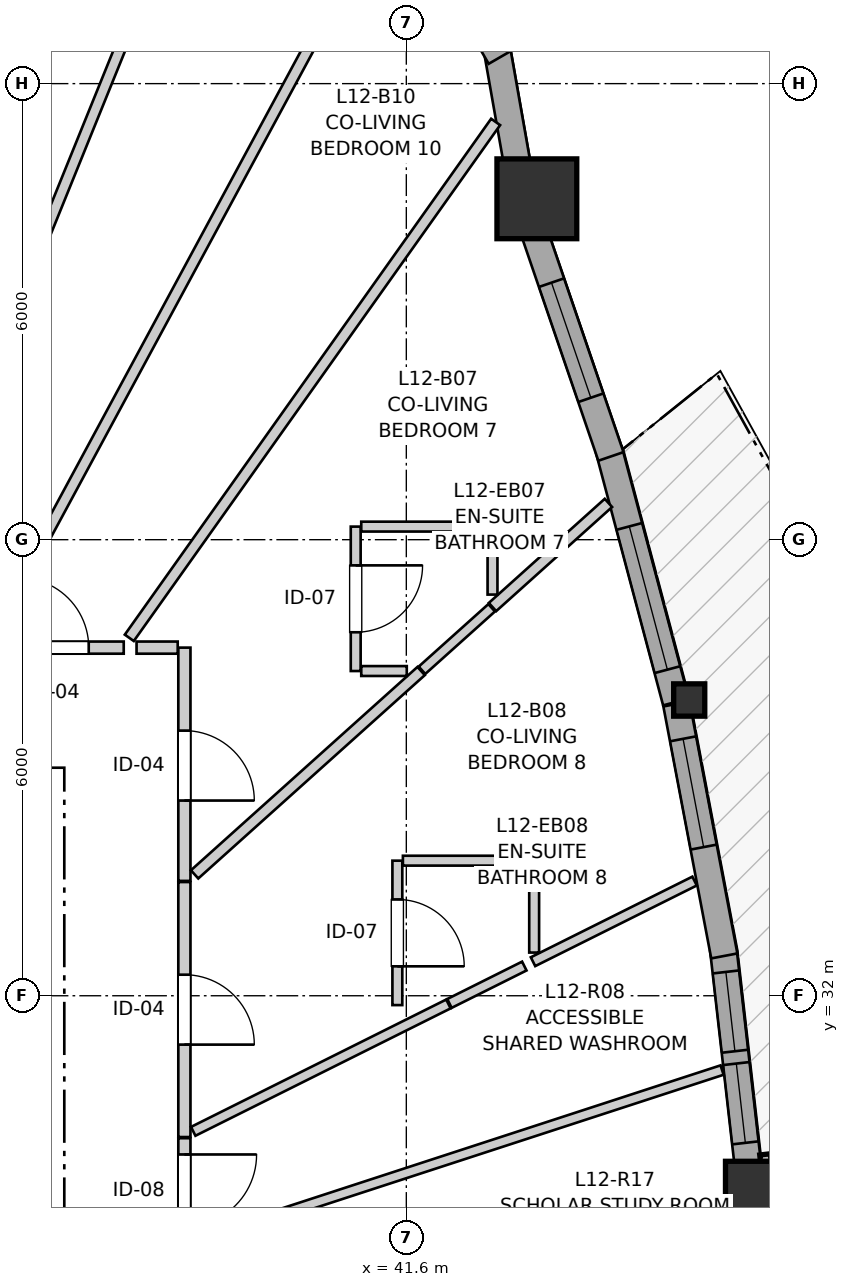
"""IFC4 building model, lengths in metres.
Left out: names, types, materials, properties, quantities, classifications, styles, units other than length and angle.
Written with IfcOpenShell. Run it as: python <this file> out.ifc"""

import sys

from ifc_helpers import new_model, si_unit, direction, frame, frame_2d, origin, origin_2d, place, context, subcontext, project, spatial, rectangle, i_section, extrude, source, transform, mapped, element, fill, save


model = new_model("IFC4")
c1 = context("Model", 3, precision=1e-05, world=origin(), true_north=direction((0.0, 1.0)))
c2 = subcontext(c1, "Body", "Model", "MODEL_VIEW")
j1 = project(units=[si_unit("LENGTHUNIT", "METRE"), si_unit("PLANEANGLEUNIT", "RADIAN")], contexts=[c1])
p1 = place(None, origin())
s1 = spatial("IfcSite", under=j1, at=p1, CompositionType="ELEMENT")
p2 = place(p1, origin())
s2 = spatial("IfcBuilding", under=s1, at=p2, CompositionType="ELEMENT")
p3 = place(p2, frame((0.0, 0.0, 43.0)))
s3 = spatial("IfcBuildingStorey", under=s2, at=p3, CompositionType="ELEMENT", Elevation=43.0)
m1 = source(origin(), c2, "Body", "SweptSolid", [
    extrude(rectangle(XDim=1.05, YDim=1.05, at=origin_2d()), origin(), (0.0, 0.0, 1.0), 2.94),
])
p4 = place(p3, frame((46.324, 29.297, 0.0), z_axis=(0.0, 0.0, 1.0), x_axis=(1.0, 0.0, 0.0)))
e1 = element("IfcColumn", 1, at=p4, inside=s3, PredefinedType="COLUMN", context=c2, shape_type="MappedRepresentation", body=[
    mapped(m1, transform((0.0, 0.0, 0.0), x_axis=(1.0, 0.0, 0.0), y_axis=(0.0, 1.0, 0.0), z_axis=(0.0, 0.0, 1.0), scale=1.0)),
])
m2 = source(origin(), c2, "Body", "SweptSolid", [
    extrude(i_section(OverallWidth=0.409, OverallDepth=0.425, WebThickness=0.03, FlangeThickness=0.048, FilletRadius=0.015, at=origin_2d()), origin(), (0.0, 0.0, 1.0), 2.94),
])
p5 = place(p3, frame((45.322, 35.891, 0.0), z_axis=(0.0, 0.0, 1.0), x_axis=(1.0, 0.0, 0.0)))
e2 = element("IfcColumn", 2, at=p5, inside=s3, PredefinedType="PILASTER", context=c2, shape_type="MappedRepresentation", body=[
    mapped(m2, transform((0.0, 0.0, 0.0), x_axis=(1.0, 0.0, 0.0), y_axis=(0.0, 1.0, 0.0), z_axis=(0.0, 0.0, 1.0), scale=1.0)),
])
p6 = place(p3, frame((43.317, 42.485, 0.0), z_axis=(0.0, 0.0, 1.0), x_axis=(1.0, 0.0, 0.0)))
e3 = element("IfcColumn", 3, at=p6, inside=s3, PredefinedType="COLUMN", context=c2, shape_type="MappedRepresentation", body=[
    mapped(m1, transform((0.0, 0.0, 0.0), x_axis=(1.0, 0.0, 0.0), y_axis=(0.0, 1.0, 0.0), z_axis=(0.0, 0.0, 1.0), scale=1.0)),
])
p7 = place(p3, frame((46.116, 29.575, 0.0), z_axis=(0.0, 0.0, 1.0), x_axis=(-0.113271733229, 0.993564046477, 0.0)))
e4 = element("IfcWall", 4, at=p7, inside=s3, PredefinedType="SOLIDWALL", context=c2, shape_type="SweptSolid", body=[
    extrude(rectangle(XDim=3.056, YDim=0.35, at=frame_2d((1.528, 0.0))), origin(), (0.0, 0.0, 1.0), 2.42),
])
p8 = place(p7, frame((0.492, 0.0, 0.82)))
e5 = element("IfcOpeningElement", 5, at=p8, cuts=e4, PredefinedType="OPENING", context=c2, shape_type="SweptSolid", body=[
    extrude(rectangle(XDim=1.05, YDim=1.45, at=frame_2d((0.525, 0.725))), frame((0.0, 0.185, 0.0), z_axis=(0.0, -1.0, 0.0), x_axis=(1.0, 0.0, 0.0)), (0.0, 0.0, 1.0), 0.37),
])
p9 = place(p7, frame((1.706, 0.0, 0.82)))
e6 = element("IfcOpeningElement", 6, at=p9, cuts=e4, PredefinedType="OPENING", context=c2, shape_type="SweptSolid", body=[
    extrude(rectangle(XDim=1.05, YDim=1.45, at=frame_2d((0.525, 0.725))), frame((0.0, 0.185, 0.0), z_axis=(0.0, -1.0, 0.0), x_axis=(1.0, 0.0, 0.0)), (0.0, 0.0, 1.0), 0.37),
])
p10 = place(p3, frame((45.784, 32.524, 0.0), z_axis=(0.0, 0.0, 1.0), x_axis=(-0.186686485801, 0.982419541754, 0.0)))
e7 = element("IfcWall", 7, at=p10, inside=s3, PredefinedType="SOLIDWALL", context=c2, shape_type="SweptSolid", body=[
    extrude(rectangle(XDim=3.374, YDim=0.35, at=frame_2d((1.687, 0.0))), origin(), (0.0, 0.0, 1.0), 2.42),
])
p11 = place(p10, frame((1.457, 0.0, 0.82)))
e8 = element("IfcOpeningElement", 8, at=p11, cuts=e7, PredefinedType="OPENING", context=c2, shape_type="SweptSolid", body=[
    extrude(rectangle(XDim=1.45, YDim=1.25, at=frame_2d((0.725, 0.625))), frame((0.0, 0.185, 0.0), z_axis=(0.0, -1.0, 0.0), x_axis=(1.0, 0.0, 0.0)), (0.0, 0.0, 1.0), 0.37),
])
p12 = place(p3, frame((45.148, 35.865, 0.0), z_axis=(0.0, 0.0, 1.0), x_axis=(-0.257064434129, 0.966394265663, 0.0)))
e9 = element("IfcWall", 9, at=p12, inside=s3, PredefinedType="SOLIDWALL", context=c2, shape_type="SweptSolid", body=[
    extrude(rectangle(XDim=3.429, YDim=0.35, at=frame_2d((1.715, 0.0))), origin(), (0.0, 0.0, 1.0), 2.42),
])
p13 = place(p12, frame((0.44, 0.0, 0.82)))
e10 = element("IfcOpeningElement", 10, at=p13, cuts=e9, PredefinedType="OPENING", context=c2, shape_type="SweptSolid", body=[
    extrude(rectangle(XDim=1.95, YDim=1.4, at=frame_2d((0.975, 0.7))), frame((0.0, 0.185, 0.0), z_axis=(0.0, -1.0, 0.0), x_axis=(1.0, 0.0, 0.0)), (0.0, 0.0, 1.0), 0.37),
])
p14 = place(p3, frame((44.292, 39.095, 0.0), z_axis=(0.0, 0.0, 1.0), x_axis=(-0.323582370233, 0.946200005112, 0.0)))
e11 = element("IfcWall", 11, at=p14, inside=s3, PredefinedType="SOLIDWALL", context=c2, shape_type="SweptSolid", body=[
    extrude(rectangle(XDim=3.222, YDim=0.35, at=frame_2d((1.611, 0.0))), origin(), (0.0, 0.0, 1.0), 2.42),
])
p15 = place(p14, frame((0.816, 0.0, 0.82)))
e12 = element("IfcOpeningElement", 12, at=p15, cuts=e11, PredefinedType="OPENING", context=c2, shape_type="SweptSolid", body=[
    extrude(rectangle(XDim=1.6, YDim=1.35, at=frame_2d((0.8, 0.675))), frame((0.0, 0.185, 0.0), z_axis=(0.0, -1.0, 0.0), x_axis=(1.0, 0.0, 0.0)), (0.0, 0.0, 1.0), 0.37),
])
p16 = place(p3, frame((43.093, 42.75, 0.0), z_axis=(0.0, 0.0, 1.0), x_axis=(-0.173610462023, 0.984814402553, 0.0)))
e13 = element("IfcWall", 13, at=p16, inside=s3, PredefinedType="SOLIDWALL", context=c2, shape_type="SweptSolid", body=[
    extrude(rectangle(XDim=1.752, YDim=0.35, at=frame_2d((0.876, 0.0))), origin(), (0.0, 0.0, 1.0), 2.42),
])
p17 = place(p3, frame((42.835, 44.348, 0.0), z_axis=(0.0, 0.0, 1.0), x_axis=(-0.499995423472, 0.866028046028, 0.0)))
e14 = element("IfcWall", 14, at=p17, inside=s3, PredefinedType="SOLIDWALL", context=c2, shape_type="SweptSolid", body=[
    extrude(rectangle(XDim=2.09, YDim=0.35, at=frame_2d((1.045, 0.0))), origin(), (0.0, 0.0, 1.0), 2.42),
])
p18 = place(p17, frame((0.42, 0.0, 0.82)))
e15 = element("IfcOpeningElement", 15, at=p18, cuts=e14, PredefinedType="OPENING", context=c2, shape_type="SweptSolid", body=[
    extrude(rectangle(XDim=1.25, YDim=1.35, at=frame_2d((0.625, 0.675))), frame((0.0, 0.185, 0.0), z_axis=(0.0, -1.0, 0.0), x_axis=(1.0, 0.0, 0.0)), (0.0, 0.0, 1.0), 0.37),
])
p19 = place(p3, frame((38.68, 33.496, 0.0), z_axis=(0.0, 0.0, 1.0), x_axis=(0.0, -1.0, 0.0)))
e16 = element("IfcWall", 16, at=p19, inside=s3, PredefinedType="PARTITIONING", context=c2, shape_type="SweptSolid", body=[
    extrude(rectangle(XDim=3.355, YDim=0.16, at=frame_2d((1.677, 0.0))), origin(), (0.0, 0.0, 1.0), 2.94),
])
p20 = place(p19, frame((1.219, 0.0, 0.0)))
e17 = element("IfcOpeningElement", 17, at=p20, cuts=e16, PredefinedType="OPENING", context=c2, shape_type="SweptSolid", body=[
    extrude(rectangle(XDim=0.92, YDim=2.1, at=frame_2d((0.46, 1.05))), frame((0.0, 0.09, 0.0), z_axis=(0.0, -1.0, 0.0), x_axis=(1.0, 0.0, 0.0)), (0.0, 0.0, 1.0), 0.18),
])
p21 = place(p3, frame((38.68, 36.58, 0.0), z_axis=(0.0, 0.0, 1.0), x_axis=(0.0, -1.0, 0.0)))
e18 = element("IfcWall", 18, at=p21, inside=s3, PredefinedType="PARTITIONING", context=c2, shape_type="SweptSolid", body=[
    extrude(rectangle(XDim=3.069, YDim=0.16, at=frame_2d((1.535, 0.0))), origin(), (0.0, 0.0, 1.0), 2.94),
])
p22 = place(p21, frame((1.092, 0.0, 0.0)))
e19 = element("IfcOpeningElement", 19, at=p22, cuts=e18, PredefinedType="OPENING", context=c2, shape_type="SweptSolid", body=[
    extrude(rectangle(XDim=0.92, YDim=2.1, at=frame_2d((0.46, 1.05))), frame((0.0, 0.09, 0.0), z_axis=(0.0, -1.0, 0.0), x_axis=(1.0, 0.0, 0.0)), (0.0, 0.0, 1.0), 0.18),
])
p23 = place(p3, frame((41.482, 33.777, 0.0), z_axis=(0.0, 0.0, 1.0), x_axis=(0.0, -1.0, 0.0)))
e20 = element("IfcWall", 20, at=p23, inside=s3, PredefinedType="PARTITIONING", context=c2, shape_type="SweptSolid", body=[
    extrude(rectangle(XDim=1.9, YDim=0.13, at=frame_2d((0.95, 0.0))), origin(), (0.0, 0.0, 1.0), 2.94),
])
p24 = place(p23, frame((0.51, 0.0, 0.0)))
e21 = element("IfcOpeningElement", 21, at=p24, cuts=e20, PredefinedType="OPENING", context=c2, shape_type="SweptSolid", body=[
    extrude(rectangle(XDim=0.88, YDim=2.05, at=frame_2d((0.44, 1.025))), frame((0.0, 0.075, 0.0), z_axis=(0.0, -1.0, 0.0), x_axis=(1.0, 0.0, 0.0)), (0.0, 0.0, 1.0), 0.15),
])
p25 = place(p3, frame((40.934, 38.172, 0.0), z_axis=(0.0, 0.0, 1.0), x_axis=(0.0, -1.0, 0.0)))
e22 = element("IfcWall", 22, at=p25, inside=s3, PredefinedType="PARTITIONING", context=c2, shape_type="SweptSolid", body=[
    extrude(rectangle(XDim=1.9, YDim=0.13, at=frame_2d((0.95, 0.0))), origin(), (0.0, 0.0, 1.0), 2.94),
])
p26 = place(p25, frame((0.51, 0.0, 0.0)))
e23 = element("IfcOpeningElement", 23, at=p26, cuts=e22, PredefinedType="OPENING", context=c2, shape_type="SweptSolid", body=[
    extrude(rectangle(XDim=0.88, YDim=2.05, at=frame_2d((0.44, 1.025))), frame((0.0, 0.075, 0.0), z_axis=(0.0, -1.0, 0.0), x_axis=(1.0, 0.0, 0.0)), (0.0, 0.0, 1.0), 0.15),
])
p27 = place(p3, frame((36.042, 36.58, 0.0), z_axis=(0.0, 0.0, 1.0), x_axis=(1.0, 0.0, 0.0)))
e24 = element("IfcWall", 24, at=p27, inside=s3, PredefinedType="PARTITIONING", context=c2, shape_type="SweptSolid", body=[
    extrude(rectangle(XDim=1.84, YDim=0.16, at=frame_2d((0.92, 0.0))), origin(), (0.0, 0.0, 1.0), 2.94),
])
p28 = place(p27, frame((0.459, 0.0, 0.0)))
e25 = element("IfcOpeningElement", 25, at=p28, cuts=e24, PredefinedType="OPENING", context=c2, shape_type="SweptSolid", body=[
    extrude(rectangle(XDim=0.92, YDim=2.1, at=frame_2d((0.46, 1.05))), frame((0.0, 0.09, 0.0), z_axis=(0.0, -1.0, 0.0), x_axis=(1.0, 0.0, 0.0)), (0.0, 0.0, 1.0), 0.18),
])
p29 = place(p3, frame((38.68, 30.126, 0.0), z_axis=(0.0, 0.0, 1.0), x_axis=(0.0, -1.0, 0.0)))
e26 = element("IfcWall", 26, at=p29, inside=s3, PredefinedType="PARTITIONING", context=c2, shape_type="SweptSolid", body=[
    extrude(rectangle(XDim=1.426, YDim=0.16, at=frame_2d((0.713, 0.0))), origin(), (0.0, 0.0, 1.0), 2.94),
])
p30 = place(p29, frame((0.214, 0.0, 0.0)))
e27 = element("IfcOpeningElement", 27, at=p30, cuts=e26, PredefinedType="OPENING", context=c2, shape_type="SweptSolid", body=[
    extrude(rectangle(XDim=0.95, YDim=2.1, at=frame_2d((0.475, 1.05))), frame((0.0, 0.09, 0.0), z_axis=(0.0, -1.0, 0.0), x_axis=(1.0, 0.0, 0.0)), (0.0, 0.0, 1.0), 0.18),
])
p31 = place(p3, frame((34.686, 36.695, 0.0), z_axis=(0.0, 0.0, 1.0), x_axis=(0.375735926904, 0.926726773776, 0.0)))
e28 = element("IfcWall", 28, at=p31, inside=s3, PredefinedType="PARTITIONING", context=c2, shape_type="SweptSolid", body=[
    extrude(rectangle(XDim=11.769, YDim=0.145, at=frame_2d((5.884, 0.0))), origin(), (0.0, 0.0, 1.0), 2.94),
])
p32 = place(p3, frame((36.125, 36.701, 0.0), z_axis=(0.0, 0.0, 1.0), x_axis=(0.474948586069, 0.880013545686, 0.0)))
e29 = element("IfcWall", 29, at=p32, inside=s3, PredefinedType="PARTITIONING", context=c2, shape_type="SweptSolid", body=[
    extrude(rectangle(XDim=10.889, YDim=0.145, at=frame_2d((5.445, 0.0))), origin(), (0.0, 0.0, 1.0), 2.94),
])
p33 = place(p3, frame((37.955, 36.708, 0.0), z_axis=(0.0, 0.0, 1.0), x_axis=(0.578991718582, 0.81533342248, 0.0)))
e30 = element("IfcWall", 30, at=p33, inside=s3, PredefinedType="PARTITIONING", context=c2, shape_type="SweptSolid", body=[
    extrude(rectangle(XDim=8.325, YDim=0.145, at=frame_2d((4.163, 0.0))), origin(), (0.0, 0.0, 1.0), 2.94),
])
p34 = place(p3, frame((38.788, 28.751, 0.0), z_axis=(0.0, 0.0, 1.0), x_axis=(0.95075822996, 0.309933522169, 0.0)))
e31 = element("IfcWall", 31, at=p34, inside=s3, PredefinedType="PARTITIONING", context=c2, shape_type="SweptSolid", body=[
    extrude(rectangle(XDim=7.327, YDim=0.13, at=frame_2d((3.664, 0.0))), origin(), (0.0, 0.0, 1.0), 2.94),
])
p35 = place(p3, frame((38.814, 33.597, 0.0), z_axis=(0.0, 0.0, 1.0), x_axis=(0.74417856937, 0.667980730927, 0.0)))
e32 = element("IfcWall", 32, at=p35, inside=s3, PredefinedType="PARTITIONING", context=c2, shape_type="SweptSolid", body=[
    extrude(rectangle(XDim=4.005, YDim=0.145, at=frame_2d((2.002, 0.0))), origin(), (0.0, 0.0, 1.0), 2.94),
])
p36 = place(p3, frame((38.796, 30.216, 0.0), z_axis=(0.0, 0.0, 1.0), x_axis=(0.894739227469, 0.446588977503, 0.0)))
e33 = element("IfcWall", 33, at=p36, inside=s3, PredefinedType="PARTITIONING", context=c2, shape_type="SweptSolid", body=[
    extrude(rectangle(XDim=3.753, YDim=0.13, at=frame_2d((1.876, 0.0))), origin(), (0.0, 0.0, 1.0), 2.94),
])
p37 = place(p3, frame((43.267, 32.448, 0.0), z_axis=(0.0, 0.0, 1.0), x_axis=(0.894755827923, 0.446555717014, 0.0)))
e34 = element("IfcWall", 34, at=p37, inside=s3, PredefinedType="PARTITIONING", context=c2, shape_type="SweptSolid", body=[
    extrude(rectangle(XDim=2.375, YDim=0.13, at=frame_2d((1.188, 0.0))), origin(), (0.0, 0.0, 1.0), 2.94),
])
p38 = place(p3, frame((42.734, 37.114, 0.0), z_axis=(0.0, 0.0, 1.0), x_axis=(0.743962922365, 0.668220899214, 0.0)))
e35 = element("IfcWall", 35, at=p38, inside=s3, PredefinedType="PARTITIONING", context=c2, shape_type="SweptSolid", body=[
    extrude(rectangle(XDim=2.05, YDim=0.145, at=frame_2d((1.025, 0.0))), origin(), (0.0, 0.0, 1.0), 2.94),
])
p39 = place(p3, frame((41.007, 38.172, 0.0), z_axis=(0.0, 0.0, 1.0), x_axis=(1.0, 0.0, 0.0)))
e36 = element("IfcWall", 36, at=p39, inside=s3, PredefinedType="PARTITIONING", context=c2, shape_type="SweptSolid", body=[
    extrude(rectangle(XDim=1.727, YDim=0.13, at=frame_2d((0.863, 0.0))), origin(), (0.0, 0.0, 1.0), 2.94),
])
p40 = place(p3, frame((41.555, 33.777, 0.0), z_axis=(0.0, 0.0, 1.0), x_axis=(1.0, 0.0, 0.0)))
e37 = element("IfcWall", 37, at=p40, inside=s3, PredefinedType="PARTITIONING", context=c2, shape_type="SweptSolid", body=[
    extrude(rectangle(XDim=1.727, YDim=0.13, at=frame_2d((0.864, 0.0))), origin(), (0.0, 0.0, 1.0), 2.94),
])
p41 = place(p3, frame((43.282, 32.568, 0.0), z_axis=(0.0, 0.0, 1.0), x_axis=(0.0, 1.0, 0.0)))
e38 = element("IfcWall", 38, at=p41, inside=s3, PredefinedType="PARTITIONING", context=c2, shape_type="SweptSolid", body=[
    extrude(rectangle(XDim=1.136, YDim=0.13, at=frame_2d((0.568, 0.0))), origin(), (0.0, 0.0, 1.0), 2.94),
])
p42 = place(p3, frame((41.806, 36.282, 0.0), z_axis=(0.0, 0.0, 1.0), x_axis=(0.744525261569, 0.667594289135, 0.0)))
e39 = element("IfcWall", 39, at=p42, inside=s3, PredefinedType="PARTITIONING", context=c2, shape_type="SweptSolid", body=[
    extrude(rectangle(XDim=1.231, YDim=0.13, at=frame_2d((0.616, 0.0))), origin(), (0.0, 0.0, 1.0), 2.94),
])
p43 = place(p3, frame((42.167, 31.899, 0.0), z_axis=(0.0, 0.0, 1.0), x_axis=(0.894604533516, 0.446858734515, 0.0)))
e40 = element("IfcWall", 40, at=p43, inside=s3, PredefinedType="PARTITIONING", context=c2, shape_type="SweptSolid", body=[
    extrude(rectangle(XDim=1.101, YDim=0.13, at=frame_2d((0.55, 0.0))), origin(), (0.0, 0.0, 1.0), 2.94),
])
p44 = place(p3, frame((42.734, 37.278, 0.0), z_axis=(0.0, 0.0, 1.0), x_axis=(0.0, 1.0, 0.0)))
e41 = element("IfcWall", 41, at=p44, inside=s3, PredefinedType="PARTITIONING", context=c2, shape_type="SweptSolid", body=[
    extrude(rectangle(XDim=0.821, YDim=0.13, at=frame_2d((0.411, 0.0))), origin(), (0.0, 0.0, 1.0), 2.94),
])
p45 = place(p3, frame((41.007, 36.272, 0.0), z_axis=(0.0, 0.0, 1.0), x_axis=(1.0, 0.0, 0.0)))
e42 = element("IfcWall", 42, at=p45, inside=s3, PredefinedType="PARTITIONING", context=c2, shape_type="SweptSolid", body=[
    extrude(rectangle(XDim=0.599, YDim=0.13, at=frame_2d((0.299, 0.0))), origin(), (0.0, 0.0, 1.0), 2.94),
])
p46 = place(p3, frame((38.051, 36.58, 0.0), z_axis=(0.0, 0.0, 1.0), x_axis=(1.0, 0.0, 0.0)))
e43 = element("IfcWall", 43, at=p46, inside=s3, PredefinedType="PARTITIONING", context=c2, shape_type="SweptSolid", body=[
    extrude(rectangle(XDim=0.541, YDim=0.16, at=frame_2d((0.271, 0.0))), origin(), (0.0, 0.0, 1.0), 2.94),
])
m3 = source(origin(), c2, "Body", "SweptSolid", [
    extrude(rectangle(XDim=1.05, YDim=1.45, at=frame_2d((0.525, 0.725))), frame((0.0, 0.03, 0.0), z_axis=(0.0, -1.0, 0.0), x_axis=(1.0, 0.0, 0.0)), (0.0, 0.0, 1.0), 0.06),
])
p47 = place(p8, origin())
e44 = element("IfcWindow", 44, at=p47, inside=s3, PartitioningType="SINGLE_PANEL", PredefinedType="WINDOW", context=c2, shape_type="MappedRepresentation", body=[
    mapped(m3, transform((0.0, 0.0, 0.0), x_axis=(1.0, 0.0, 0.0), y_axis=(0.0, 1.0, 0.0), z_axis=(0.0, 0.0, 1.0), scale=1.0)),
])
fill(e5, e44)
p48 = place(p9, origin())
e45 = element("IfcWindow", 45, at=p48, inside=s3, PartitioningType="SINGLE_PANEL", PredefinedType="WINDOW", context=c2, shape_type="MappedRepresentation", body=[
    mapped(m3, transform((0.0, 0.0, 0.0), x_axis=(1.0, 0.0, 0.0), y_axis=(0.0, 1.0, 0.0), z_axis=(0.0, 0.0, 1.0), scale=1.0)),
])
fill(e6, e45)
m4 = source(origin(), c2, "Body", "SweptSolid", [
    extrude(rectangle(XDim=1.45, YDim=1.25, at=frame_2d((0.725, 0.625))), frame((0.0, 0.03, 0.0), z_axis=(0.0, -1.0, 0.0), x_axis=(1.0, 0.0, 0.0)), (0.0, 0.0, 1.0), 0.06),
])
p49 = place(p11, origin())
e46 = element("IfcWindow", 46, at=p49, inside=s3, PartitioningType="SINGLE_PANEL", PredefinedType="WINDOW", context=c2, shape_type="MappedRepresentation", body=[
    mapped(m4, transform((0.0, 0.0, 0.0), x_axis=(1.0, 0.0, 0.0), y_axis=(0.0, 1.0, 0.0), z_axis=(0.0, 0.0, 1.0), scale=1.0)),
])
fill(e8, e46)
m5 = source(origin(), c2, "Body", "SweptSolid", [
    extrude(rectangle(XDim=1.95, YDim=1.4, at=frame_2d((0.975, 0.7))), frame((0.0, 0.03, 0.0), z_axis=(0.0, -1.0, 0.0), x_axis=(1.0, 0.0, 0.0)), (0.0, 0.0, 1.0), 0.06),
])
p50 = place(p13, origin())
e47 = element("IfcWindow", 47, at=p50, inside=s3, PartitioningType="SINGLE_PANEL", PredefinedType="WINDOW", context=c2, shape_type="MappedRepresentation", body=[
    mapped(m5, transform((0.0, 0.0, 0.0), x_axis=(1.0, 0.0, 0.0), y_axis=(0.0, 1.0, 0.0), z_axis=(0.0, 0.0, 1.0), scale=1.0)),
])
fill(e10, e47)
m6 = source(origin(), c2, "Body", "SweptSolid", [
    extrude(rectangle(XDim=1.6, YDim=1.35, at=frame_2d((0.8, 0.675))), frame((0.0, 0.03, 0.0), z_axis=(0.0, -1.0, 0.0), x_axis=(1.0, 0.0, 0.0)), (0.0, 0.0, 1.0), 0.06),
])
p51 = place(p15, origin())
e48 = element("IfcWindow", 48, at=p51, inside=s3, PartitioningType="SINGLE_PANEL", PredefinedType="WINDOW", context=c2, shape_type="MappedRepresentation", body=[
    mapped(m6, transform((0.0, 0.0, 0.0), x_axis=(1.0, 0.0, 0.0), y_axis=(0.0, 1.0, 0.0), z_axis=(0.0, 0.0, 1.0), scale=1.0)),
])
fill(e12, e48)
m7 = source(origin(), c2, "Body", "SweptSolid", [
    extrude(rectangle(XDim=0.92, YDim=2.1, at=frame_2d((0.46, 1.05))), frame((0.0, 0.025, 0.0), z_axis=(0.0, -1.0, 0.0), x_axis=(1.0, 0.0, 0.0)), (0.0, 0.0, 1.0), 0.05),
])
p52 = place(p20, origin())
e49 = element("IfcDoor", 49, at=p52, inside=s3, OperationType="SINGLE_SWING_RIGHT", PredefinedType="DOOR", context=c2, shape_type="MappedRepresentation", body=[
    mapped(m7, transform((0.0, 0.0, 0.0), x_axis=(1.0, 0.0, 0.0), y_axis=(0.0, 1.0, 0.0), z_axis=(0.0, 0.0, 1.0), scale=1.0)),
])
fill(e17, e49)
p53 = place(p22, origin())
e50 = element("IfcDoor", 50, at=p53, inside=s3, OperationType="SINGLE_SWING_RIGHT", PredefinedType="DOOR", context=c2, shape_type="MappedRepresentation", body=[
    mapped(m7, transform((0.0, 0.0, 0.0), x_axis=(1.0, 0.0, 0.0), y_axis=(0.0, 1.0, 0.0), z_axis=(0.0, 0.0, 1.0), scale=1.0)),
])
fill(e19, e50)
m8 = source(origin(), c2, "Body", "SweptSolid", [
    extrude(rectangle(XDim=0.88, YDim=2.05, at=frame_2d((0.44, 1.025))), frame((0.0, 0.025, 0.0), z_axis=(0.0, -1.0, 0.0), x_axis=(1.0, 0.0, 0.0)), (0.0, 0.0, 1.0), 0.05),
])
p54 = place(p24, origin())
e51 = element("IfcDoor", 51, at=p54, inside=s3, OperationType="SINGLE_SWING_RIGHT", PredefinedType="DOOR", context=c2, shape_type="MappedRepresentation", body=[
    mapped(m8, transform((0.0, 0.0, 0.0), x_axis=(1.0, 0.0, 0.0), y_axis=(0.0, 1.0, 0.0), z_axis=(0.0, 0.0, 1.0), scale=1.0)),
])
fill(e21, e51)
p55 = place(p26, origin())
e52 = element("IfcDoor", 52, at=p55, inside=s3, OperationType="SINGLE_SWING_LEFT", PredefinedType="DOOR", context=c2, shape_type="MappedRepresentation", body=[
    mapped(m8, transform((0.0, 0.0, 0.0), x_axis=(1.0, 0.0, 0.0), y_axis=(0.0, 1.0, 0.0), z_axis=(0.0, 0.0, 1.0), scale=1.0)),
])
fill(e23, e52)
p56 = place(p28, origin())
e53 = element("IfcDoor", 53, at=p56, inside=s3, OperationType="SINGLE_SWING_LEFT", PredefinedType="DOOR", context=c2, shape_type="MappedRepresentation", body=[
    mapped(m7, transform((0.0, 0.0, 0.0), x_axis=(1.0, 0.0, 0.0), y_axis=(0.0, 1.0, 0.0), z_axis=(0.0, 0.0, 1.0), scale=1.0)),
])
fill(e25, e53)
m9 = source(origin(), c2, "Body", "SweptSolid", [
    extrude(rectangle(XDim=0.95, YDim=2.1, at=frame_2d((0.475, 1.05))), frame((0.0, 0.025, 0.0), z_axis=(0.0, -1.0, 0.0), x_axis=(1.0, 0.0, 0.0)), (0.0, 0.0, 1.0), 0.05),
])
p57 = place(p30, origin())
e54 = element("IfcDoor", 54, at=p57, inside=s3, OperationType="SINGLE_SWING_LEFT", PredefinedType="DOOR", context=c2, shape_type="MappedRepresentation", body=[
    mapped(m9, transform((0.0, 0.0, 0.0), x_axis=(1.0, 0.0, 0.0), y_axis=(0.0, 1.0, 0.0), z_axis=(0.0, 0.0, 1.0), scale=1.0)),
])
fill(e27, e54)
save(model, sys.argv[1])
